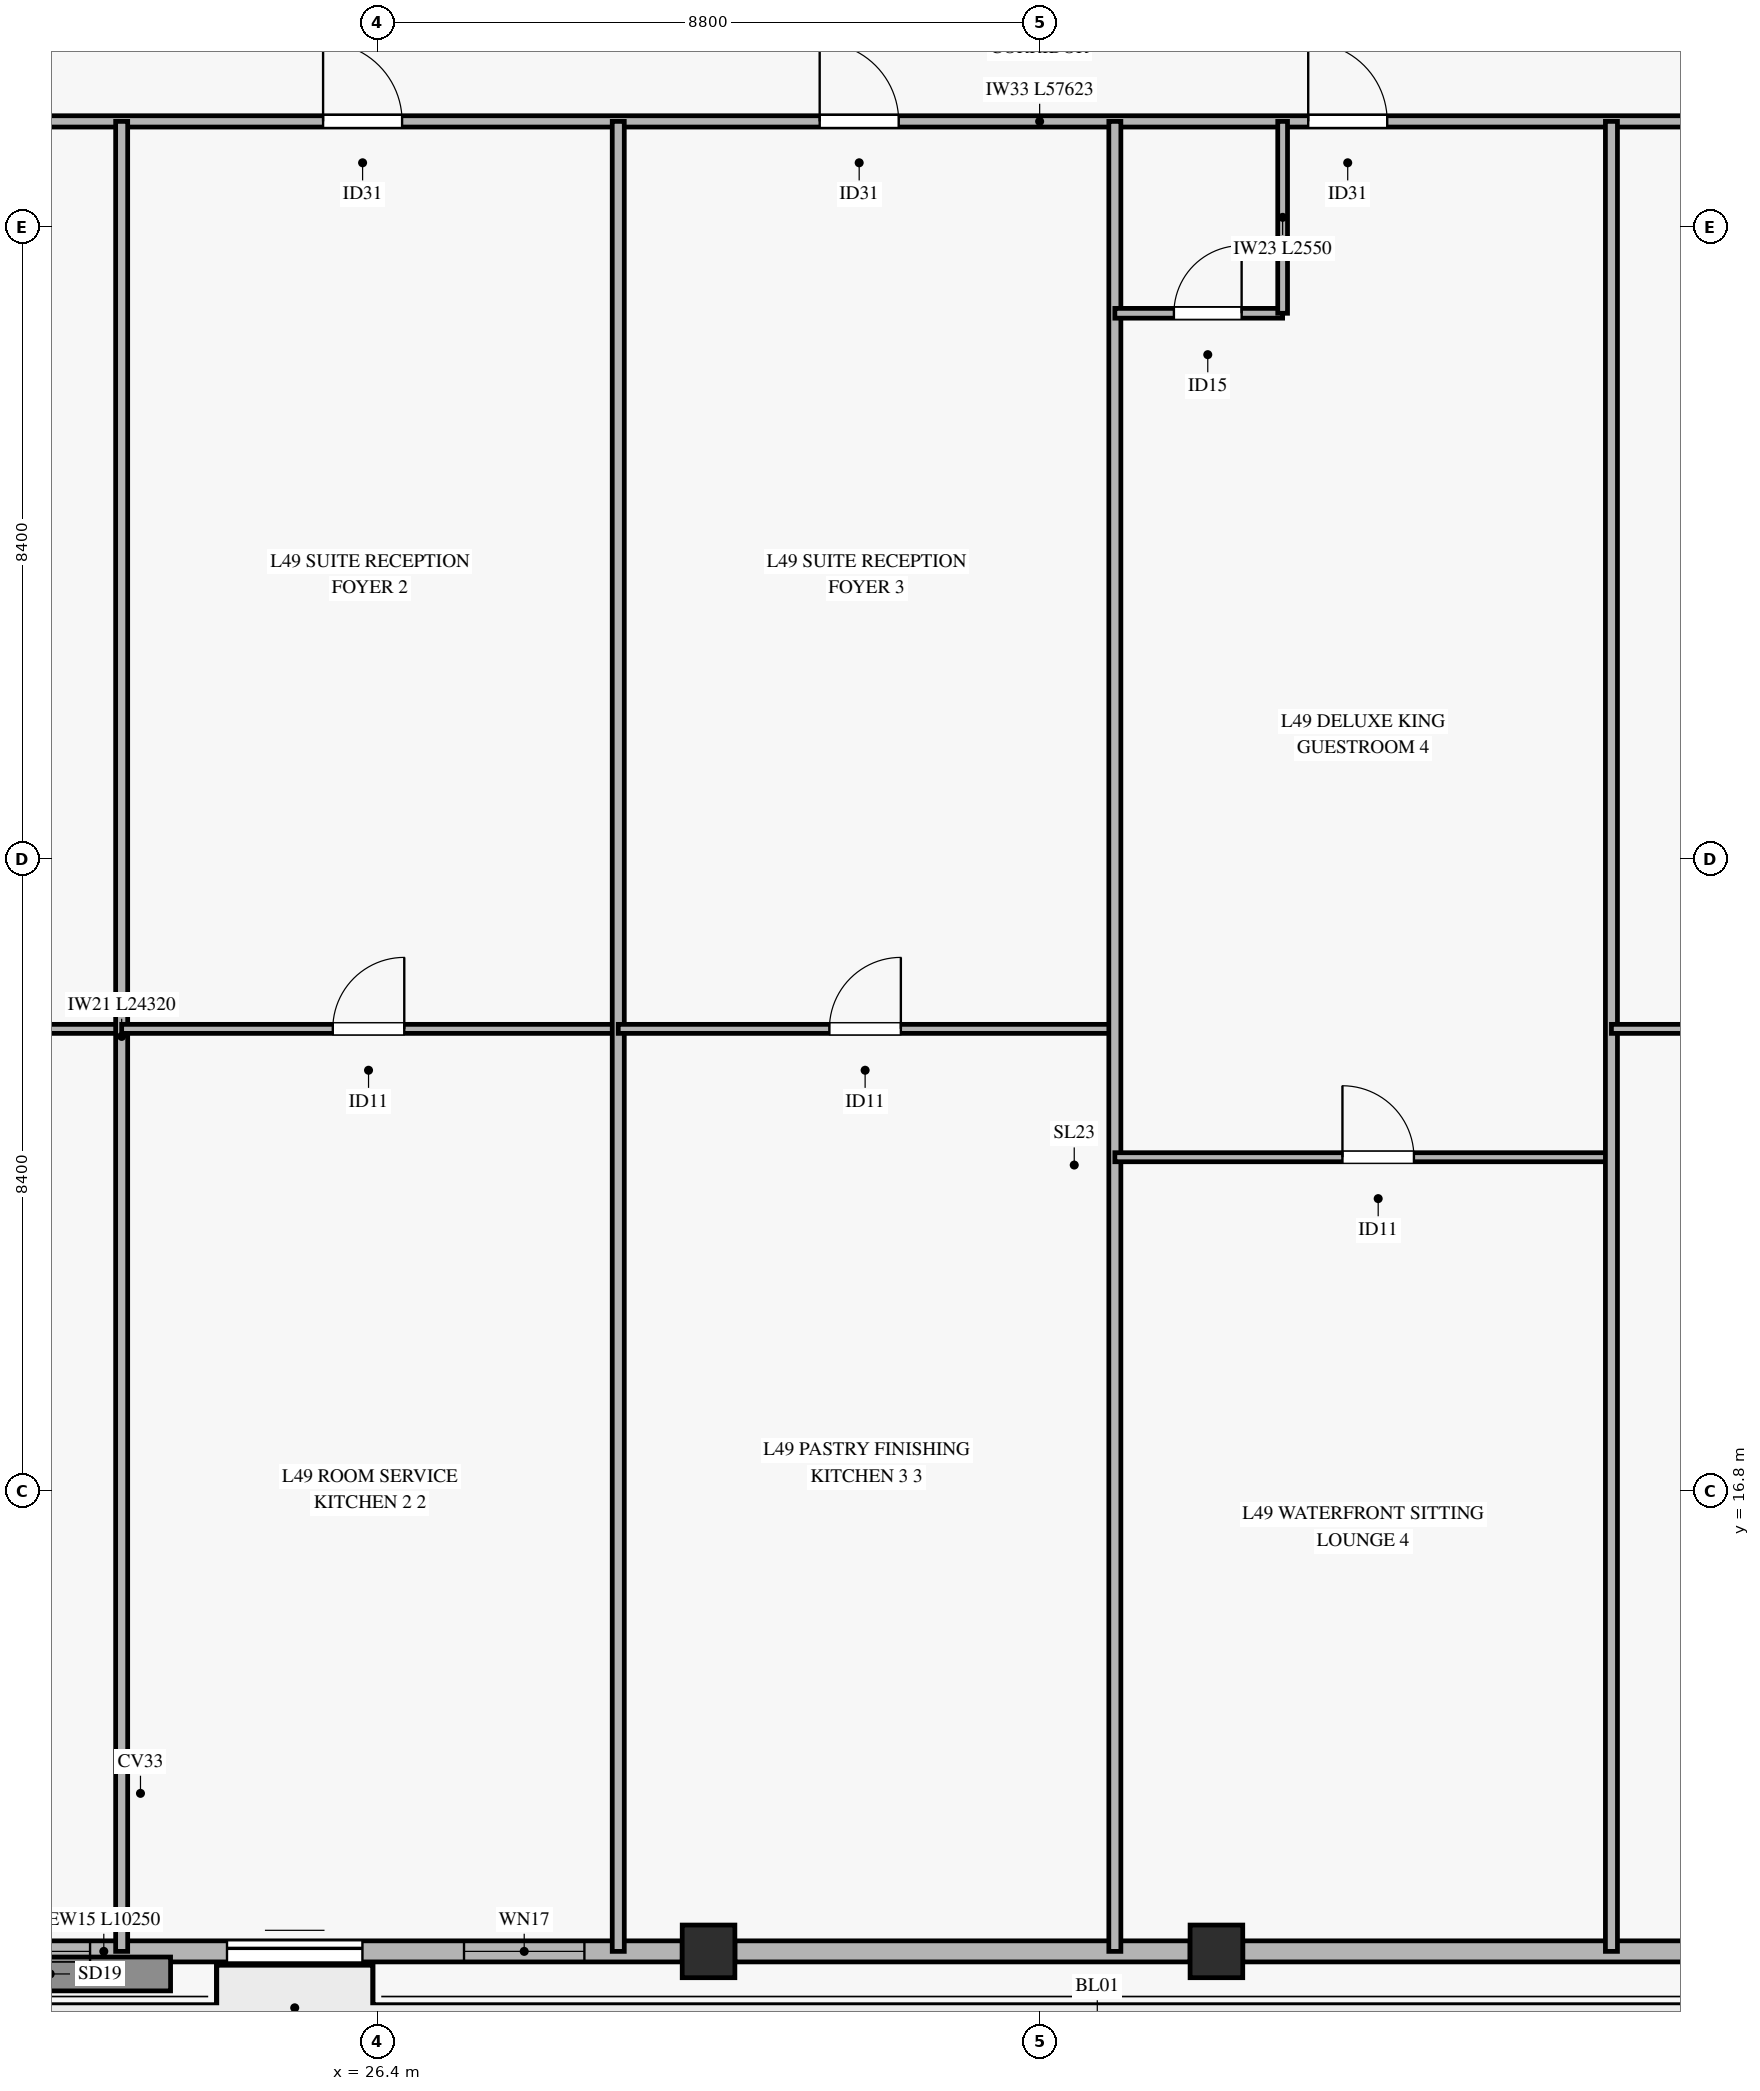
"""IFC4 building model, lengths in metres.
Left out: names, types, materials, properties, quantities, classifications, styles, units other than length and angle.
Written with IfcOpenShell. Run it as: python <this file> out.ifc"""

import sys

from ifc_helpers import new_model, si_unit, direction, frame, frame_2d, origin, origin_2d, place, context, subcontext, project, spatial, rectangle, hollow_rectangle, extrude, source, transform, mapped, element, fill, save


model = new_model("IFC4")
c1 = context("Model", 3, precision=1e-05, world=origin(), true_north=direction((0.0, 1.0)))
c2 = subcontext(c1, "Body", "Model", "MODEL_VIEW")
j1 = project(units=[si_unit("LENGTHUNIT", "METRE"), si_unit("PLANEANGLEUNIT", "RADIAN")], contexts=[c1])
p1 = place(None, origin())
s1 = spatial("IfcSite", under=j1, at=p1, CompositionType="ELEMENT")
p2 = place(p1, origin())
s2 = spatial("IfcBuilding", under=s1, at=p2, CompositionType="ELEMENT")
p3 = place(p2, frame((0.0, 0.0, 195.7)))
s3 = spatial("IfcBuildingStorey", under=s2, at=p3, CompositionType="ELEMENT", Elevation=195.7)
m1 = source(origin(), c2, "Body", "SweptSolid", [
    extrude(hollow_rectangle(XDim=0.7, YDim=0.7, WallThickness=0.032, at=origin_2d()), origin(), (0.0, 0.0, 1.0), 3.27),
])
for number, where, z_axis, x_axis in (
    (1, (30.8, 10.68, 0.0), (0.0, 0.0, 1.0), (1.0, 0.0, 0.0)),
    (2, (37.55, 10.68, 0.0), (0.0, 0.0, 1.0), (1.0, 0.0, 0.0)),
):
    element("IfcColumn", number, at=place(p3, frame(where, z_axis=z_axis, x_axis=x_axis)), inside=s3, PredefinedType="COLUMN", context=c2, shape_type="MappedRepresentation", body=[
        mapped(m1, transform((0.0, 0.0, 0.0), x_axis=(1.0, 0.0, 0.0), y_axis=(0.0, 1.0, 0.0), z_axis=(0.0, 0.0, 1.0), scale=1.0)),
    ])
p4 = place(p3, frame((20.2, 10.68, 0.0), z_axis=(0.0, 0.0, 1.0), x_axis=(1.0, 0.0, 0.0)))
e3 = element("IfcWall", 3, at=p4, inside=s3, PredefinedType="SOLIDWALL", context=c2, shape_type="SweptSolid", body=[
    extrude(rectangle(XDim=10.25, YDim=0.28, at=frame_2d((5.125, 0.0))), origin(), (0.0, 0.0, 1.0), 2.75),
])
p5 = place(p4, frame((4.2, 0.0, 0.0)))
e4 = element("IfcOpeningElement", 4, at=p5, cuts=e3, PredefinedType="OPENING", context=c2, shape_type="SweptSolid", body=[
    extrude(rectangle(XDim=1.8, YDim=2.25, at=frame_2d((0.9, 1.125))), frame((0.0, 0.15, 0.0), z_axis=(0.0, -1.0, 0.0), x_axis=(1.0, 0.0, 0.0)), (0.0, 0.0, 1.0), 0.3),
])
p6 = place(p4, frame((0.38, 0.0, 0.45)))
e5 = element("IfcOpeningElement", 5, at=p6, cuts=e3, PredefinedType="OPENING", context=c2, shape_type="SweptSolid", body=[
    extrude(rectangle(XDim=2.0, YDim=2.0, at=frame_2d((1.0, 1.0))), frame((0.0, 0.15, 0.0), z_axis=(0.0, -1.0, 0.0), x_axis=(1.0, 0.0, 0.0)), (0.0, 0.0, 1.0), 0.3),
])
p7 = place(p4, frame((7.35, 0.0, 0.45)))
e6 = element("IfcOpeningElement", 6, at=p7, cuts=e3, PredefinedType="OPENING", context=c2, shape_type="SweptSolid", body=[
    extrude(rectangle(XDim=1.6, YDim=2.0, at=frame_2d((0.8, 1.0))), frame((0.0, 0.15, 0.0), z_axis=(0.0, -1.0, 0.0), x_axis=(1.0, 0.0, 0.0)), (0.0, 0.0, 1.0), 0.3),
])
for number, where, z_axis, x_axis in (
    (7, (31.15, 10.68, 0.0), (0.0, 0.0, 1.0), (1.0, 0.0, 0.0)),
    (8, (37.9, 10.68, 0.0), (0.0, 0.0, 1.0), (1.0, 0.0, 0.0)),
):
    element("IfcWall", number, at=place(p3, frame(where, z_axis=z_axis, x_axis=x_axis)), inside=s3, PredefinedType="SOLIDWALL", context=c2, shape_type="SweptSolid", body=[
        extrude(rectangle(XDim=6.05, YDim=0.28, at=frame_2d((3.025, 0.0))), origin(), (0.0, 0.0, 1.0), 2.75),
    ])
p8 = place(p3, frame((6.389, 35.0, 0.0), z_axis=(0.0, 0.0, 1.0), x_axis=(1.0, 0.0, 0.0)))
e9 = element("IfcWall", 9, at=p8, inside=s3, PredefinedType="PARTITIONING", context=c2, shape_type="SweptSolid", body=[
    extrude(rectangle(XDim=57.623, YDim=0.15, at=frame_2d((28.812, 0.0))), origin(), (0.0, 0.0, 1.0), 2.455),
])
p9 = place(p8, frame((6.605, 0.0, 0.0)))
e10 = element("IfcOpeningElement", 10, at=p9, cuts=e9, PredefinedType="OPENING", context=c2, shape_type="SweptSolid", body=[
    extrude(rectangle(XDim=1.05, YDim=2.15, at=frame_2d((0.525, 1.075))), frame((0.0, 0.085, 0.0), z_axis=(0.0, -1.0, 0.0), x_axis=(1.0, 0.0, 0.0)), (0.0, 0.0, 1.0), 0.17),
])
p10 = place(p8, frame((19.288, 0.0, 0.0)))
e11 = element("IfcOpeningElement", 11, at=p10, cuts=e9, PredefinedType="OPENING", context=c2, shape_type="SweptSolid", body=[
    extrude(rectangle(XDim=1.05, YDim=2.15, at=frame_2d((0.525, 1.075))), frame((0.0, 0.085, 0.0), z_axis=(0.0, -1.0, 0.0), x_axis=(1.0, 0.0, 0.0)), (0.0, 0.0, 1.0), 0.17),
])
p11 = place(p8, frame((25.888, 0.0, 0.0)))
e12 = element("IfcOpeningElement", 12, at=p11, cuts=e9, PredefinedType="OPENING", context=c2, shape_type="SweptSolid", body=[
    extrude(rectangle(XDim=1.05, YDim=2.15, at=frame_2d((0.525, 1.075))), frame((0.0, 0.085, 0.0), z_axis=(0.0, -1.0, 0.0), x_axis=(1.0, 0.0, 0.0)), (0.0, 0.0, 1.0), 0.17),
])
p12 = place(p8, frame((32.381, 0.0, 0.0)))
e13 = element("IfcOpeningElement", 13, at=p12, cuts=e9, PredefinedType="OPENING", context=c2, shape_type="SweptSolid", body=[
    extrude(rectangle(XDim=1.05, YDim=2.15, at=frame_2d((0.525, 1.075))), frame((0.0, 0.085, 0.0), z_axis=(0.0, -1.0, 0.0), x_axis=(1.0, 0.0, 0.0)), (0.0, 0.0, 1.0), 0.17),
])
p13 = place(p8, frame((44.565, 0.0, 0.0)))
e14 = element("IfcOpeningElement", 14, at=p13, cuts=e9, PredefinedType="OPENING", context=c2, shape_type="SweptSolid", body=[
    extrude(rectangle(XDim=1.05, YDim=2.15, at=frame_2d((0.525, 1.075))), frame((0.0, 0.085, 0.0), z_axis=(0.0, -1.0, 0.0), x_axis=(1.0, 0.0, 0.0)), (0.0, 0.0, 1.0), 0.17),
])
p14 = place(p3, frame((6.389, 22.94, 0.0), z_axis=(0.0, 0.0, 1.0), x_axis=(1.0, 0.0, 0.0)))
e15 = element("IfcWall", 15, at=p14, inside=s3, PredefinedType="PARTITIONING", context=c2, shape_type="SweptSolid", body=[
    extrude(rectangle(XDim=16.611, YDim=0.12, at=frame_2d((8.306, 0.0))), origin(), (0.0, 0.0, 1.0), 2.455),
])
p15 = place(p14, frame((6.93, 0.0, 0.0)))
e16 = element("IfcOpeningElement", 16, at=p15, cuts=e15, PredefinedType="OPENING", context=c2, shape_type="SweptSolid", body=[
    extrude(rectangle(XDim=0.95, YDim=2.1, at=frame_2d((0.475, 1.05))), frame((0.0, 0.07, 0.0), z_axis=(0.0, -1.0, 0.0), x_axis=(1.0, 0.0, 0.0)), (0.0, 0.0, 1.0), 0.14),
])
p16 = place(p3, frame((23.0, 10.68, 0.0), z_axis=(0.0, 0.0, 1.0), x_axis=(0.0, 1.0, 0.0)))
e17 = element("IfcWall", 17, at=p16, inside=s3, PredefinedType="PARTITIONING", context=c2, shape_type="SweptSolid", body=[
    extrude(rectangle(XDim=24.32, YDim=0.16, at=frame_2d((12.16, 0.0))), origin(), (0.0, 0.0, 1.0), 2.755),
])
p17 = place(p3, frame((23.0, 22.94, 0.0), z_axis=(0.0, 0.0, 1.0), x_axis=(1.0, 0.0, 0.0)))
e18 = element("IfcWall", 18, at=p17, inside=s3, PredefinedType="PARTITIONING", context=c2, shape_type="SweptSolid", body=[
    extrude(rectangle(XDim=6.6, YDim=0.12, at=frame_2d((3.3, 0.0))), origin(), (0.0, 0.0, 1.0), 3.27),
])
p18 = place(p17, frame((2.806, 0.0, 0.0)))
e19 = element("IfcOpeningElement", 19, at=p18, cuts=e18, PredefinedType="OPENING", context=c2, shape_type="SweptSolid", body=[
    extrude(rectangle(XDim=0.95, YDim=2.1, at=frame_2d((0.475, 1.05))), frame((0.0, 0.07, 0.0), z_axis=(0.0, -1.0, 0.0), x_axis=(1.0, 0.0, 0.0)), (0.0, 0.0, 1.0), 0.14),
])
p19 = place(p3, frame((29.6, 10.68, 0.0), z_axis=(0.0, 0.0, 1.0), x_axis=(0.0, 1.0, 0.0)))
e20 = element("IfcWall", 20, at=p19, inside=s3, PredefinedType="PARTITIONING", context=c2, shape_type="SweptSolid", body=[
    extrude(rectangle(XDim=24.32, YDim=0.16, at=frame_2d((12.16, 0.0))), origin(), (0.0, 0.0, 1.0), 2.755),
])
p20 = place(p3, frame((29.6, 22.94, 0.0), z_axis=(0.0, 0.0, 1.0), x_axis=(1.0, 0.0, 0.0)))
e21 = element("IfcWall", 21, at=p20, inside=s3, PredefinedType="PARTITIONING", context=c2, shape_type="SweptSolid", body=[
    extrude(rectangle(XDim=6.6, YDim=0.12, at=frame_2d((3.3, 0.0))), origin(), (0.0, 0.0, 1.0), 2.455),
])
p21 = place(p20, frame((2.806, 0.0, 0.0)))
e22 = element("IfcOpeningElement", 22, at=p21, cuts=e21, PredefinedType="OPENING", context=c2, shape_type="SweptSolid", body=[
    extrude(rectangle(XDim=0.95, YDim=2.1, at=frame_2d((0.475, 1.05))), frame((0.0, 0.07, 0.0), z_axis=(0.0, -1.0, 0.0), x_axis=(1.0, 0.0, 0.0)), (0.0, 0.0, 1.0), 0.14),
])
p22 = place(p3, frame((36.2, 10.68, 0.0), z_axis=(0.0, 0.0, 1.0), x_axis=(0.0, 1.0, 0.0)))
e23 = element("IfcWall", 23, at=p22, inside=s3, PredefinedType="PARTITIONING", context=c2, shape_type="SweptSolid", body=[
    extrude(rectangle(XDim=24.32, YDim=0.16, at=frame_2d((12.16, 0.0))), origin(), (0.0, 0.0, 1.0), 2.755),
])
p23 = place(p3, frame((36.2, 32.45, 0.0), z_axis=(0.0, 0.0, 1.0), x_axis=(1.0, 0.0, 0.0)))
e24 = element("IfcWall", 24, at=p23, inside=s3, PredefinedType="PARTITIONING", context=c2, shape_type="SweptSolid", body=[
    extrude(rectangle(XDim=2.23, YDim=0.13, at=frame_2d((1.115, 0.0))), origin(), (0.0, 0.0, 1.0), 2.455),
])
p24 = place(p23, frame((0.785, 0.0, 0.0)))
e25 = element("IfcOpeningElement", 25, at=p24, cuts=e24, PredefinedType="OPENING", context=c2, shape_type="SweptSolid", body=[
    extrude(rectangle(XDim=0.9, YDim=2.1, at=frame_2d((0.45, 1.05))), frame((0.0, 0.075, 0.0), z_axis=(0.0, -1.0, 0.0), x_axis=(1.0, 0.0, 0.0)), (0.0, 0.0, 1.0), 0.15),
])
p25 = place(p3, frame((38.43, 32.45, 0.0), z_axis=(0.0, 0.0, 1.0), x_axis=(0.0, 1.0, 0.0)))
e26 = element("IfcWall", 26, at=p25, inside=s3, PredefinedType="PARTITIONING", context=c2, shape_type="SweptSolid", body=[
    extrude(rectangle(XDim=2.55, YDim=0.13, at=frame_2d((1.275, 0.0))), origin(), (0.0, 0.0, 1.0), 2.805),
])
p26 = place(p3, frame((36.2, 21.234, 0.0), z_axis=(0.0, 0.0, 1.0), x_axis=(1.0, 0.0, 0.0)))
e27 = element("IfcWall", 27, at=p26, inside=s3, PredefinedType="PARTITIONING", context=c2, shape_type="SweptSolid", body=[
    extrude(rectangle(XDim=6.6, YDim=0.12, at=frame_2d((3.3, 0.0))), origin(), (0.0, 0.0, 1.0), 2.455),
])
p27 = place(p26, frame((3.025, 0.0, 0.0)))
e28 = element("IfcOpeningElement", 28, at=p27, cuts=e27, PredefinedType="OPENING", context=c2, shape_type="SweptSolid", body=[
    extrude(rectangle(XDim=0.95, YDim=2.1, at=frame_2d((0.475, 1.05))), frame((0.0, 0.07, 0.0), z_axis=(0.0, -1.0, 0.0), x_axis=(1.0, 0.0, 0.0)), (0.0, 0.0, 1.0), 0.14),
])
p28 = place(p3, frame((42.8, 10.68, 0.0), z_axis=(0.0, 0.0, 1.0), x_axis=(0.0, 1.0, 0.0)))
e29 = element("IfcWall", 29, at=p28, inside=s3, PredefinedType="PARTITIONING", context=c2, shape_type="SweptSolid", body=[
    extrude(rectangle(XDim=24.32, YDim=0.16, at=frame_2d((12.16, 0.0))), origin(), (0.0, 0.0, 1.0), 2.755),
])
p29 = place(p3, frame((42.8, 22.94, 0.0), z_axis=(0.0, 0.0, 1.0), x_axis=(1.0, 0.0, 0.0)))
e30 = element("IfcWall", 30, at=p29, inside=s3, PredefinedType="PARTITIONING", context=c2, shape_type="SweptSolid", body=[
    extrude(rectangle(XDim=21.212, YDim=0.12, at=frame_2d((10.606, 0.0))), origin(), (0.0, 0.0, 1.0), 2.455),
])
p30 = place(p29, frame((8.571, 0.0, 0.0)))
e31 = element("IfcOpeningElement", 31, at=p30, cuts=e30, PredefinedType="OPENING", context=c2, shape_type="SweptSolid", body=[
    extrude(rectangle(XDim=0.95, YDim=2.1, at=frame_2d((0.475, 1.05))), frame((0.0, 0.07, 0.0), z_axis=(0.0, -1.0, 0.0), x_axis=(1.0, 0.0, 0.0)), (0.0, 0.0, 1.0), 0.14),
])
m2 = source(origin(), c2, "Body", "SweptSolid", [
    extrude(rectangle(XDim=1.8, YDim=2.25, at=frame_2d((0.9, 1.125))), frame((0.0, 0.025, 0.0), z_axis=(0.0, -1.0, 0.0), x_axis=(1.0, 0.0, 0.0)), (0.0, 0.0, 1.0), 0.05),
])
p31 = place(p5, origin())
e32 = element("IfcDoor", 32, at=p31, inside=s3, OperationType="SLIDING_TO_LEFT", PredefinedType="DOOR", context=c2, shape_type="MappedRepresentation", body=[
    mapped(m2, transform((0.0, 0.0, 0.0), x_axis=(1.0, 0.0, 0.0), y_axis=(0.0, 1.0, 0.0), z_axis=(0.0, 0.0, 1.0), scale=1.0)),
])
fill(e4, e32)
m3 = source(origin(), c2, "Body", "SweptSolid", [
    extrude(rectangle(XDim=2.0, YDim=2.0, at=frame_2d((1.0, 1.0))), frame((0.0, 0.03, 0.0), z_axis=(0.0, -1.0, 0.0), x_axis=(1.0, 0.0, 0.0)), (0.0, 0.0, 1.0), 0.06),
])
p32 = place(p6, origin())
e33 = element("IfcWindow", 33, at=p32, inside=s3, PartitioningType="SINGLE_PANEL", PredefinedType="WINDOW", context=c2, shape_type="MappedRepresentation", body=[
    mapped(m3, transform((0.0, 0.0, 0.0), x_axis=(1.0, 0.0, 0.0), y_axis=(0.0, 1.0, 0.0), z_axis=(0.0, 0.0, 1.0), scale=1.0)),
])
fill(e5, e33)
m4 = source(origin(), c2, "Body", "SweptSolid", [
    extrude(rectangle(XDim=1.6, YDim=2.0, at=frame_2d((0.8, 1.0))), frame((0.0, 0.03, 0.0), z_axis=(0.0, -1.0, 0.0), x_axis=(1.0, 0.0, 0.0)), (0.0, 0.0, 1.0), 0.06),
])
p33 = place(p7, origin())
e34 = element("IfcWindow", 34, at=p33, inside=s3, PartitioningType="SINGLE_PANEL", PredefinedType="WINDOW", context=c2, shape_type="MappedRepresentation", body=[
    mapped(m4, transform((0.0, 0.0, 0.0), x_axis=(1.0, 0.0, 0.0), y_axis=(0.0, 1.0, 0.0), z_axis=(0.0, 0.0, 1.0), scale=1.0)),
])
fill(e6, e34)
m5 = source(origin(), c2, "Body", "SweptSolid", [
    extrude(rectangle(XDim=1.05, YDim=2.15, at=frame_2d((0.525, 1.075))), frame((0.0, 0.025, 0.0), z_axis=(0.0, -1.0, 0.0), x_axis=(1.0, 0.0, 0.0)), (0.0, 0.0, 1.0), 0.05),
])
p34 = place(p10, origin())
e35 = element("IfcDoor", 35, at=p34, inside=s3, OperationType="SINGLE_SWING_LEFT", PredefinedType="DOOR", context=c2, shape_type="MappedRepresentation", body=[
    mapped(m5, transform((0.0, 0.0, 0.0), x_axis=(1.0, 0.0, 0.0), y_axis=(0.0, 1.0, 0.0), z_axis=(0.0, 0.0, 1.0), scale=1.0)),
])
fill(e11, e35)
m6 = source(origin(), c2, "Body", "SweptSolid", [
    extrude(rectangle(XDim=0.95, YDim=2.1, at=frame_2d((0.475, 1.05))), frame((0.0, 0.025, 0.0), z_axis=(0.0, -1.0, 0.0), x_axis=(1.0, 0.0, 0.0)), (0.0, 0.0, 1.0), 0.05),
])
p35 = place(p18, origin())
e36 = element("IfcDoor", 36, at=p35, inside=s3, OperationType="SINGLE_SWING_RIGHT", PredefinedType="DOOR", context=c2, shape_type="MappedRepresentation", body=[
    mapped(m6, transform((0.0, 0.0, 0.0), x_axis=(1.0, 0.0, 0.0), y_axis=(0.0, 1.0, 0.0), z_axis=(0.0, 0.0, 1.0), scale=1.0)),
])
fill(e19, e36)
p36 = place(p11, origin())
e37 = element("IfcDoor", 37, at=p36, inside=s3, OperationType="SINGLE_SWING_LEFT", PredefinedType="DOOR", context=c2, shape_type="MappedRepresentation", body=[
    mapped(m5, transform((0.0, 0.0, 0.0), x_axis=(1.0, 0.0, 0.0), y_axis=(0.0, 1.0, 0.0), z_axis=(0.0, 0.0, 1.0), scale=1.0)),
])
fill(e12, e37)
p37 = place(p21, origin())
e38 = element("IfcDoor", 38, at=p37, inside=s3, OperationType="SINGLE_SWING_RIGHT", PredefinedType="DOOR", context=c2, shape_type="MappedRepresentation", body=[
    mapped(m6, transform((0.0, 0.0, 0.0), x_axis=(1.0, 0.0, 0.0), y_axis=(0.0, 1.0, 0.0), z_axis=(0.0, 0.0, 1.0), scale=1.0)),
])
fill(e22, e38)
p38 = place(p12, origin())
e39 = element("IfcDoor", 39, at=p38, inside=s3, OperationType="SINGLE_SWING_LEFT", PredefinedType="DOOR", context=c2, shape_type="MappedRepresentation", body=[
    mapped(m5, transform((0.0, 0.0, 0.0), x_axis=(1.0, 0.0, 0.0), y_axis=(0.0, 1.0, 0.0), z_axis=(0.0, 0.0, 1.0), scale=1.0)),
])
fill(e13, e39)
m7 = source(origin(), c2, "Body", "SweptSolid", [
    extrude(rectangle(XDim=0.9, YDim=2.1, at=frame_2d((0.45, 1.05))), frame((0.0, 0.025, 0.0), z_axis=(0.0, -1.0, 0.0), x_axis=(1.0, 0.0, 0.0)), (0.0, 0.0, 1.0), 0.05),
])
p39 = place(p24, origin())
e40 = element("IfcDoor", 40, at=p39, inside=s3, OperationType="SINGLE_SWING_RIGHT", PredefinedType="DOOR", context=c2, shape_type="MappedRepresentation", body=[
    mapped(m7, transform((0.0, 0.0, 0.0), x_axis=(1.0, 0.0, 0.0), y_axis=(0.0, 1.0, 0.0), z_axis=(0.0, 0.0, 1.0), scale=1.0)),
])
fill(e25, e40)
p40 = place(p27, origin())
e41 = element("IfcDoor", 41, at=p40, inside=s3, OperationType="SINGLE_SWING_LEFT", PredefinedType="DOOR", context=c2, shape_type="MappedRepresentation", body=[
    mapped(m6, transform((0.0, 0.0, 0.0), x_axis=(1.0, 0.0, 0.0), y_axis=(0.0, 1.0, 0.0), z_axis=(0.0, 0.0, 1.0), scale=1.0)),
])
fill(e28, e41)
save(model, sys.argv[1])
